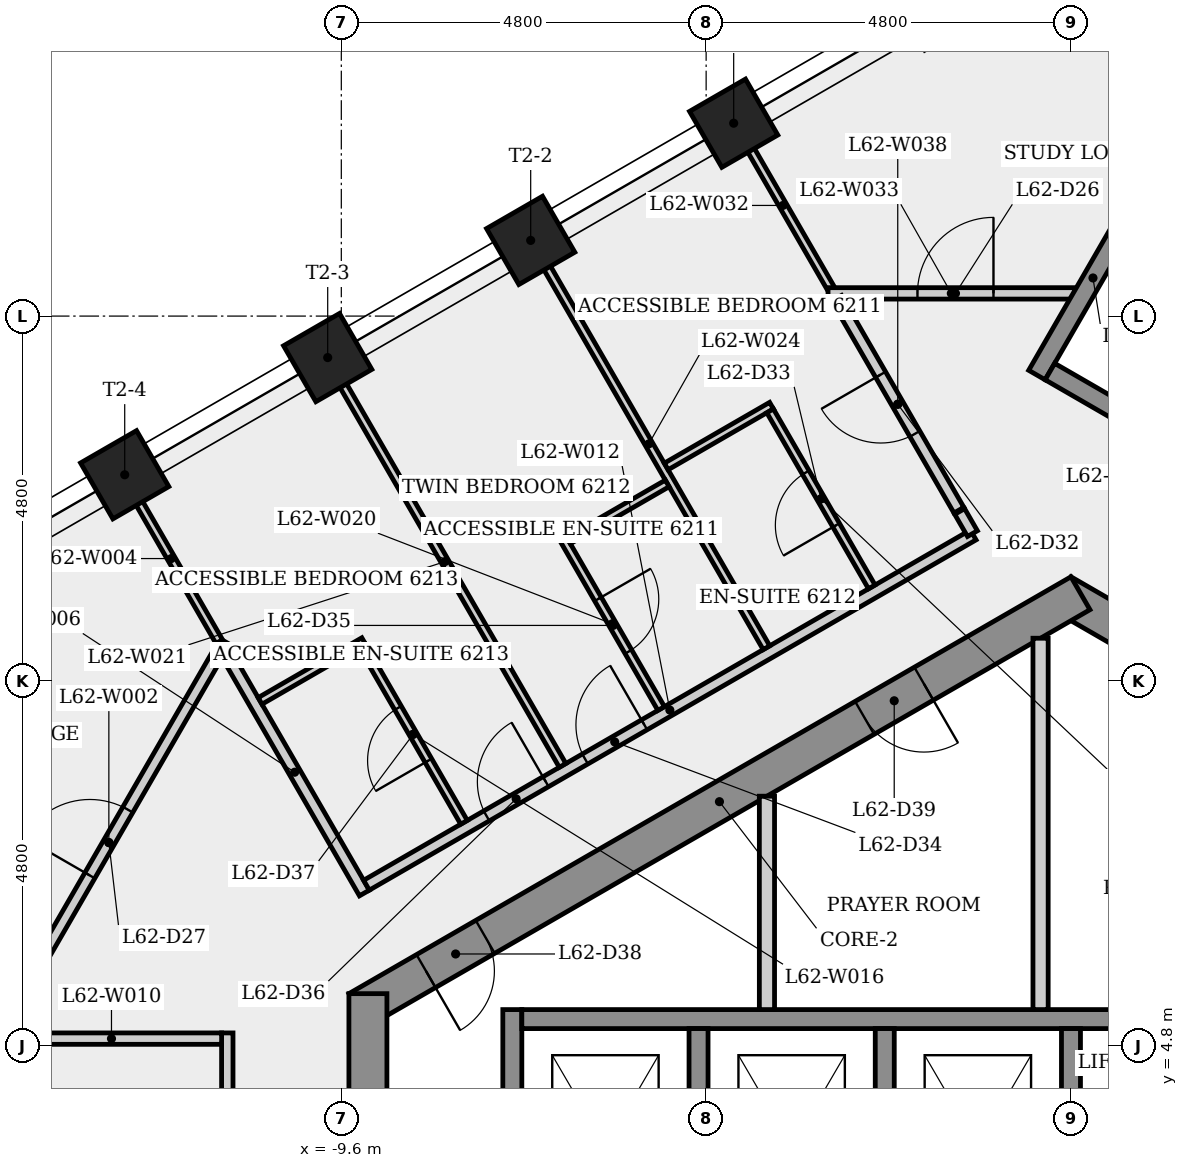
"""IFC4 building model, lengths in metres.
Left out: names, types, materials, properties, quantities, classifications, styles, units other than length and angle.
Written with IfcOpenShell. Run it as: python <this file> out.ifc"""

import sys

from ifc_helpers import new_model, si_unit, direction, frame, frame_2d, origin, origin_2d, place, context, subcontext, project, spatial, rectangle, extrude, element, fill, save


model = new_model("IFC4")
c1 = context("Model", 3, precision=1e-05, world=origin(), true_north=direction((0.0, 1.0)))
c2 = subcontext(c1, "Body", "Model", "MODEL_VIEW")
j1 = project(units=[si_unit("LENGTHUNIT", "METRE"), si_unit("PLANEANGLEUNIT", "RADIAN")], contexts=[c1])
p1 = place(None, origin())
s1 = spatial("IfcSite", under=j1, at=p1, CompositionType="ELEMENT")
p2 = place(p1, origin())
s2 = spatial("IfcBuilding", under=s1, at=p2, CompositionType="ELEMENT")
p3 = place(p2, frame((0.0, 0.0, 232.5)))
s3 = spatial("IfcBuildingStorey", under=s2, at=p3, CompositionType="ELEMENT", Elevation=232.5)
p4 = place(p3, frame((9.375, 5.268, 0.0), z_axis=(0.0, 0.0, 1.0), x_axis=(-0.866023993627, 0.500002442456, 0.0)))
e1 = element("IfcWall", 1, at=p4, inside=s3, PredefinedType="SHEAR", context=c2, shape_type="SweptSolid", body=[
    extrude(rectangle(XDim=10.97, YDim=0.5, at=frame_2d((5.485, 0.0))), origin(), (0.0, 0.0, 1.0), 3.4),
])
p5 = place(p4, frame((8.383, 0.0, 0.0)))
e2 = element("IfcOpeningElement", 2, at=p5, cuts=e1, PredefinedType="OPENING", context=c2, shape_type="SweptSolid", body=[
    extrude(rectangle(XDim=0.9, YDim=2.1, at=frame_2d((0.45, 1.05))), frame((0.0, 0.26, 0.0), z_axis=(0.0, -1.0, 0.0), x_axis=(1.0, 0.0, 0.0)), (0.0, 0.0, 1.0), 0.52),
])
p6 = place(p4, frame((3.165, 0.0, 0.0)))
e3 = element("IfcOpeningElement", 3, at=p6, cuts=e1, PredefinedType="OPENING", context=c2, shape_type="SweptSolid", body=[
    extrude(rectangle(XDim=0.9, YDim=2.1, at=frame_2d((0.45, 1.05))), frame((0.0, 0.26, 0.0), z_axis=(0.0, -1.0, 0.0), x_axis=(1.0, 0.0, 0.0)), (0.0, 0.0, 1.0), 0.52),
])
p7 = place(p3, frame((0.125, 10.753, 0.0), z_axis=(0.0, 0.0, 1.0), x_axis=(-0.866023993627, -0.500002442456, 0.0)))
e4 = element("IfcWall", 4, at=p7, inside=s3, PredefinedType="SHEAR", context=c2, shape_type="SweptSolid", body=[
    extrude(rectangle(XDim=10.97, YDim=0.5, at=frame_2d((5.485, 0.0))), origin(), (0.0, 0.0, 1.0), 3.4),
])
p8 = place(p7, frame((9.043, 0.0, 0.0)))
e5 = element("IfcOpeningElement", 5, at=p8, cuts=e4, PredefinedType="OPENING", context=c2, shape_type="SweptSolid", body=[
    extrude(rectangle(XDim=0.9, YDim=2.1, at=frame_2d((0.45, 1.05))), frame((0.0, 0.26, 0.0), z_axis=(0.0, -1.0, 0.0), x_axis=(1.0, 0.0, 0.0)), (0.0, 0.0, 1.0), 0.52),
])
p9 = place(p7, frame((2.38, 0.0, 0.0)))
e6 = element("IfcOpeningElement", 6, at=p9, cuts=e4, PredefinedType="OPENING", context=c2, shape_type="SweptSolid", body=[
    extrude(rectangle(XDim=0.9, YDim=2.1, at=frame_2d((0.45, 1.05))), frame((0.0, 0.26, 0.0), z_axis=(0.0, -1.0, 0.0), x_axis=(1.0, 0.0, 0.0)), (0.0, 0.0, 1.0), 0.52),
])
p10 = place(p3, frame((-9.25, 5.485, 0.0), z_axis=(0.0, 0.0, 1.0), x_axis=(0.0, -1.0, 0.0)))
e7 = element("IfcWall", 7, at=p10, inside=s3, PredefinedType="SHEAR", context=c2, shape_type="SweptSolid", body=[
    extrude(rectangle(XDim=10.97, YDim=0.5, at=frame_2d((5.485, 0.0))), origin(), (0.0, 0.0, 1.0), 3.4),
])
p11 = place(p10, frame((8.51, 0.0, 0.0)))
e8 = element("IfcOpeningElement", 8, at=p11, cuts=e7, PredefinedType="OPENING", context=c2, shape_type="SweptSolid", body=[
    extrude(rectangle(XDim=0.9, YDim=2.1, at=frame_2d((0.45, 1.05))), frame((0.0, 0.26, 0.0), z_axis=(0.0, -1.0, 0.0), x_axis=(1.0, 0.0, 0.0)), (0.0, 0.0, 1.0), 0.52),
])
p12 = place(p10, frame((4.685, 0.0, 0.0)))
e9 = element("IfcOpeningElement", 9, at=p12, cuts=e7, PredefinedType="OPENING", context=c2, shape_type="SweptSolid", body=[
    extrude(rectangle(XDim=1.6, YDim=2.1, at=frame_2d((0.8, 1.05))), frame((0.0, 0.26, 0.0), z_axis=(0.0, -1.0, 0.0), x_axis=(1.0, 0.0, 0.0)), (0.0, 0.0, 1.0), 0.52),
])
for number, where, z_axis, x_axis in (
    (10, (-4.438, 16.938, 0.0), (0.0, 0.0, 1.0), (-0.5, 0.866, 0.0)),
    (11, (-7.108, 15.396, 0.0), (0.0, 0.0, 1.0), (-0.5, 0.866, 0.0)),
    (12, (-9.779, 13.854, 0.0), (0.0, 0.0, 1.0), (-0.5, 0.866, 0.0)),
    (13, (-12.45, 12.312, 0.0), (0.0, 0.0, 1.0), (-0.5, 0.866, 0.0)),
):
    element("IfcColumn", number, at=place(p3, frame(where, z_axis=z_axis, x_axis=x_axis)), inside=s3, PredefinedType="COLUMN", context=c2, shape_type="SweptSolid", body=[
        extrude(rectangle(XDim=0.85, YDim=0.85, at=origin_2d()), origin(), (0.0, 0.0, 1.0), 3.4),
    ])
p13 = place(p3, frame((-14.185, 4.828, 0.0), z_axis=(0.0, 0.0, 1.0), x_axis=(0.50002117804, 0.866013176292, 0.0)))
e14 = element("IfcWall", 14, at=p13, inside=s3, PredefinedType="PARTITIONING", context=c2, shape_type="SweptSolid", body=[
    extrude(rectangle(XDim=6.108, YDim=0.15, at=frame_2d((3.054, 0.0))), origin(), (0.0, 0.0, 1.0), 3.05),
])
p14 = place(p13, frame((2.554, 0.0, 0.0)))
e15 = element("IfcOpeningElement", 15, at=p14, cuts=e14, PredefinedType="OPENING", context=c2, shape_type="SweptSolid", body=[
    extrude(rectangle(XDim=1.0, YDim=2.1, at=frame_2d((0.5, 1.05))), frame((0.0, 0.085, 0.0), z_axis=(0.0, -1.0, 0.0), x_axis=(1.0, 0.0, 0.0)), (0.0, 0.0, 1.0), 0.17),
])
p15 = place(p3, frame((-12.468, 12.302, 0.0), z_axis=(0.0, 0.0, 1.0), x_axis=(0.500032459767, -0.866006662318, 0.0)))
e16 = element("IfcWall", 16, at=p15, inside=s3, PredefinedType="PARTITIONING", context=c2, shape_type="SweptSolid", body=[
    extrude(rectangle(XDim=2.522, YDim=0.1, at=frame_2d((1.261, 0.0))), origin(), (0.0, 0.0, 1.0), 3.05),
])
p16 = place(p3, frame((-11.131, 9.988, 0.0), z_axis=(0.0, 0.0, 1.0), x_axis=(0.499973899091, -0.866040472627, 0.0)))
e17 = element("IfcWall", 17, at=p16, inside=s3, PredefinedType="PARTITIONING", context=c2, shape_type="SweptSolid", body=[
    extrude(rectangle(XDim=3.67, YDim=0.15, at=frame_2d((1.835, 0.0))), origin(), (0.0, 0.0, 1.0), 3.05),
])
p17 = place(p3, frame((-11.1, -4.893, 0.0), z_axis=(0.0, 0.0, 1.0), x_axis=(0.0, 1.0, 0.0)))
e18 = element("IfcWall", 18, at=p17, inside=s3, PredefinedType="PARTITIONING", context=c2, shape_type="SweptSolid", body=[
    extrude(rectangle(XDim=9.861, YDim=0.15, at=frame_2d((4.931, 0.0))), origin(), (0.0, 0.0, 1.0), 3.05),
])
p18 = place(p17, frame((7.655, 0.0, 0.0)))
e19 = element("IfcOpeningElement", 19, at=p18, cuts=e18, PredefinedType="OPENING", context=c2, shape_type="SweptSolid", body=[
    extrude(rectangle(XDim=1.0, YDim=2.1, at=frame_2d((0.5, 1.05))), frame((0.0, 0.085, 0.0), z_axis=(0.0, -1.0, 0.0), x_axis=(1.0, 0.0, 0.0)), (0.0, 0.0, 1.0), 0.17),
])
p19 = place(p17, frame((4.393, 0.0, 0.0)))
e20 = element("IfcOpeningElement", 20, at=p19, cuts=e18, PredefinedType="OPENING", context=c2, shape_type="SweptSolid", body=[
    extrude(rectangle(XDim=1.0, YDim=2.1, at=frame_2d((0.5, 1.05))), frame((0.0, 0.085, 0.0), z_axis=(0.0, -1.0, 0.0), x_axis=(1.0, 0.0, 0.0)), (0.0, 0.0, 1.0), 0.17),
])
p20 = place(p17, frame((1.131, 0.0, 0.0)))
e21 = element("IfcOpeningElement", 21, at=p20, cuts=e18, PredefinedType="OPENING", context=c2, shape_type="SweptSolid", body=[
    extrude(rectangle(XDim=1.0, YDim=2.1, at=frame_2d((0.5, 1.05))), frame((0.0, 0.085, 0.0), z_axis=(0.0, -1.0, 0.0), x_axis=(1.0, 0.0, 0.0)), (0.0, 0.0, 1.0), 0.17),
])
p21 = place(p3, frame((-11.175, 4.893, 0.0), z_axis=(0.0, 0.0, 1.0), x_axis=(-1.0, 0.0, 0.0)))
e22 = element("IfcWall", 22, at=p21, inside=s3, PredefinedType="PARTITIONING", context=c2, shape_type="SweptSolid", body=[
    extrude(rectangle(XDim=2.898, YDim=0.15, at=frame_2d((1.449, 0.0))), origin(), (0.0, 0.0, 1.0), 3.05),
])
p22 = place(p3, frame((-9.305, 10.124, 0.0), z_axis=(0.0, 0.0, 1.0), x_axis=(-0.866069430361, -0.499923735979, 0.0)))
e23 = element("IfcWall", 23, at=p22, inside=s3, PredefinedType="PARTITIONING", context=c2, shape_type="SweptSolid", body=[
    extrude(rectangle(XDim=1.575, YDim=0.1, at=frame_2d((0.788, 0.0))), origin(), (0.0, 0.0, 1.0), 3.05),
])
p23 = place(p3, frame((-9.269, 6.912, 0.0), z_axis=(0.0, 0.0, 1.0), x_axis=(0.866021065666, 0.500007513767, 0.0)))
e24 = element("IfcWall", 24, at=p23, inside=s3, PredefinedType="PARTITIONING", context=c2, shape_type="SweptSolid", body=[
    extrude(rectangle(XDim=9.218, YDim=0.15, at=frame_2d((4.609, 0.0))), origin(), (0.0, 0.0, 1.0), 3.05),
])
p24 = place(p23, frame((3.321, 0.0, 0.0)))
e25 = element("IfcOpeningElement", 25, at=p24, cuts=e24, PredefinedType="OPENING", context=c2, shape_type="SweptSolid", body=[
    extrude(rectangle(XDim=0.9, YDim=2.1, at=frame_2d((0.45, 1.05))), frame((0.0, 0.085, 0.0), z_axis=(0.0, -1.0, 0.0), x_axis=(1.0, 0.0, 0.0)), (0.0, 0.0, 1.0), 0.17),
])
p25 = place(p23, frame((1.824, 0.0, 0.0)))
e26 = element("IfcOpeningElement", 26, at=p25, cuts=e24, PredefinedType="OPENING", context=c2, shape_type="SweptSolid", body=[
    extrude(rectangle(XDim=0.9, YDim=2.1, at=frame_2d((0.45, 1.05))), frame((0.0, 0.085, 0.0), z_axis=(0.0, -1.0, 0.0), x_axis=(1.0, 0.0, 0.0)), (0.0, 0.0, 1.0), 0.17),
])
p26 = place(p3, frame((-7.986, 7.739, 0.0), z_axis=(0.0, 0.0, 1.0), x_axis=(-0.50003581814, 0.866004723184, 0.0)))
e27 = element("IfcWall", 27, at=p26, inside=s3, PredefinedType="PARTITIONING", context=c2, shape_type="SweptSolid", body=[
    extrude(rectangle(XDim=2.675, YDim=0.1, at=frame_2d((1.337, 0.0))), origin(), (0.0, 0.0, 1.0), 3.05),
])
p27 = place(p26, frame((0.938, 0.0, 0.0)))
e28 = element("IfcOpeningElement", 28, at=p27, cuts=e27, PredefinedType="OPENING", context=c2, shape_type="SweptSolid", body=[
    extrude(rectangle(XDim=0.8, YDim=2.1, at=frame_2d((0.4, 1.05))), frame((0.0, 0.06, 0.0), z_axis=(0.0, -1.0, 0.0), x_axis=(1.0, 0.0, 0.0)), (0.0, 0.0, 1.0), 0.12),
])
p28 = place(p3, frame((-7.35, 1.925, 0.0), z_axis=(0.0, 0.0, 1.0), x_axis=(0.0, 1.0, 0.0)))
e29 = element("IfcWall", 29, at=p28, inside=s3, PredefinedType="SHEAR", context=c2, shape_type="SweptSolid", body=[
    extrude(rectangle(XDim=3.35, YDim=0.25, at=frame_2d((1.675, 0.0))), origin(), (0.0, 0.0, 1.0), 3.05),
])
p29 = place(p3, frame((-7.225, 5.15, 0.0), z_axis=(0.0, 0.0, 1.0), x_axis=(1.0, 0.0, 0.0)))
e30 = element("IfcWall", 30, at=p29, inside=s3, PredefinedType="SHEAR", context=c2, shape_type="SweptSolid", body=[
    extrude(rectangle(XDim=14.7, YDim=0.25, at=frame_2d((7.35, 0.0))), origin(), (0.0, 0.0, 1.0), 3.05),
])
p30 = place(p3, frame((-6.679, 11.467, 0.0), z_axis=(0.0, 0.0, 1.0), x_axis=(0.500034319456, -0.866005588531, 0.0)))
e31 = element("IfcWall", 31, at=p30, inside=s3, PredefinedType="PARTITIONING", context=c2, shape_type="SweptSolid", body=[
    extrude(rectangle(XDim=2.575, YDim=0.1, at=frame_2d((1.288, 0.0))), origin(), (0.0, 0.0, 1.0), 3.05),
])
p31 = place(p30, frame((0.913, 0.0, 0.0)))
e32 = element("IfcOpeningElement", 32, at=p31, cuts=e31, PredefinedType="OPENING", context=c2, shape_type="SweptSolid", body=[
    extrude(rectangle(XDim=0.8, YDim=2.1, at=frame_2d((0.4, 1.05))), frame((0.0, 0.06, 0.0), z_axis=(0.0, -1.0, 0.0), x_axis=(1.0, 0.0, 0.0)), (0.0, 0.0, 1.0), 0.12),
])
p32 = place(p3, frame((-6.689, 8.488, 0.0), z_axis=(0.0, 0.0, 1.0), x_axis=(-0.499997752344, 0.866026701465, 0.0)))
e33 = element("IfcWall", 33, at=p32, inside=s3, PredefinedType="PARTITIONING", context=c2, shape_type="SweptSolid", body=[
    extrude(rectangle(XDim=6.192, YDim=0.1, at=frame_2d((3.096, 0.0))), origin(), (0.0, 0.0, 1.0), 3.05),
])
p33 = place(p3, frame((-7.103, 15.399, 0.0), z_axis=(0.0, 0.0, 1.0), x_axis=(0.500027320894, -0.866009629484, 0.0)))
e34 = element("IfcWall", 34, at=p33, inside=s3, PredefinedType="PARTITIONING", context=c2, shape_type="SweptSolid", body=[
    extrude(rectangle(XDim=6.193, YDim=0.1, at=frame_2d((3.096, 0.0))), origin(), (0.0, 0.0, 1.0), 3.05),
])
p34 = place(p3, frame((-5.312, 12.198, 0.0), z_axis=(0.0, 0.0, 1.0), x_axis=(-0.866031096941, -0.499990139034, 0.0)))
e35 = element("IfcWall", 35, at=p34, inside=s3, PredefinedType="PARTITIONING", context=c2, shape_type="SweptSolid", body=[
    extrude(rectangle(XDim=1.5, YDim=0.1, at=frame_2d((0.75, 0.0))), origin(), (0.0, 0.0, 1.0), 3.05),
])
p35 = place(p3, frame((-4.9, 5.025, 0.0), z_axis=(0.0, 0.0, 1.0), x_axis=(0.0, -1.0, 0.0)))
e36 = element("IfcWall", 36, at=p35, inside=s3, PredefinedType="SHEAR", context=c2, shape_type="SweptSolid", body=[
    extrude(rectangle(XDim=3.1, YDim=0.25, at=frame_2d((1.55, 0.0))), origin(), (0.0, 0.0, 1.0), 3.4),
])
p36 = place(p3, frame((-4.0, 8.083, 0.0), z_axis=(0.0, 0.0, 1.0), x_axis=(0.0, -1.0, 0.0)))
e37 = element("IfcWall", 37, at=p36, inside=s3, PredefinedType="PARTITIONING", context=c2, shape_type="SweptSolid", body=[
    extrude(rectangle(XDim=2.808, YDim=0.2, at=frame_2d((1.404, 0.0))), origin(), (0.0, 0.0, 1.0), 3.05),
])
p37 = place(p3, frame((-3.94, 13.221, 0.0), z_axis=(0.0, 0.0, 1.0), x_axis=(-0.866028054938, -0.499995408039, 0.0)))
e38 = element("IfcWall", 38, at=p37, inside=s3, PredefinedType="PARTITIONING", context=c2, shape_type="SweptSolid", body=[
    extrude(rectangle(XDim=1.6, YDim=0.1, at=frame_2d((0.8, 0.0))), origin(), (0.0, 0.0, 1.0), 3.05),
])
p38 = place(p3, frame((-3.159, 14.764, 0.0), z_axis=(0.0, 0.0, 1.0), x_axis=(-0.500032459767, 0.866006662318, 0.0)))
e39 = element("IfcWall", 39, at=p38, inside=s3, PredefinedType="PARTITIONING", context=c2, shape_type="SweptSolid", body=[
    extrude(rectangle(XDim=2.522, YDim=0.1, at=frame_2d((1.261, 0.0))), origin(), (0.0, 0.0, 1.0), 3.05),
])
p39 = place(p3, frame((-3.196, 14.699, 0.0), z_axis=(0.0, 0.0, 1.0), x_axis=(1.0, 0.0, 0.0)))
e40 = element("IfcWall", 40, at=p39, inside=s3, PredefinedType="PARTITIONING", context=c2, shape_type="SweptSolid", body=[
    extrude(rectangle(XDim=3.244, YDim=0.15, at=frame_2d((1.622, 0.0))), origin(), (0.0, 0.0, 1.0), 3.05),
])
p40 = place(p39, frame((1.177, 0.0, 0.0)))
e41 = element("IfcOpeningElement", 41, at=p40, cuts=e40, PredefinedType="OPENING", context=c2, shape_type="SweptSolid", body=[
    extrude(rectangle(XDim=1.0, YDim=2.1, at=frame_2d((0.5, 1.05))), frame((0.0, 0.085, 0.0), z_axis=(0.0, -1.0, 0.0), x_axis=(1.0, 0.0, 0.0)), (0.0, 0.0, 1.0), 0.17),
])
p41 = place(p3, frame((-2.621, 10.836, 0.0), z_axis=(0.0, 0.0, 1.0), x_axis=(-0.499967368674, 0.86604424267, 0.0)))
e42 = element("IfcWall", 42, at=p41, inside=s3, PredefinedType="PARTITIONING", context=c2, shape_type="SweptSolid", body=[
    extrude(rectangle(XDim=2.675, YDim=0.1, at=frame_2d((1.337, 0.0))), origin(), (0.0, 0.0, 1.0), 3.05),
])
p42 = place(p41, frame((0.938, 0.0, 0.0)))
e43 = element("IfcOpeningElement", 43, at=p42, cuts=e42, PredefinedType="OPENING", context=c2, shape_type="SweptSolid", body=[
    extrude(rectangle(XDim=0.8, YDim=2.1, at=frame_2d((0.4, 1.05))), frame((0.0, 0.06, 0.0), z_axis=(0.0, -1.0, 0.0), x_axis=(1.0, 0.0, 0.0)), (0.0, 0.0, 1.0), 0.12),
])
p43 = place(p3, frame((-2.45, 5.025, 0.0), z_axis=(0.0, 0.0, 1.0), x_axis=(0.0, -1.0, 0.0)))
e44 = element("IfcWall", 44, at=p43, inside=s3, PredefinedType="SHEAR", context=c2, shape_type="SweptSolid", body=[
    extrude(rectangle(XDim=3.1, YDim=0.25, at=frame_2d((1.55, 0.0))), origin(), (0.0, 0.0, 1.0), 3.4),
])
p44 = place(p3, frame((-1.474, 11.846, 0.0), z_axis=(0.0, 0.0, 1.0), x_axis=(-0.499989454812, 0.866031491966, 0.0)))
e45 = element("IfcWall", 45, at=p44, inside=s3, PredefinedType="PARTITIONING", context=c2, shape_type="SweptSolid", body=[
    extrude(rectangle(XDim=3.219, YDim=0.15, at=frame_2d((1.609, 0.0))), origin(), (0.0, 0.0, 1.0), 3.05),
])
p45 = place(p44, frame((1.159, 0.0, 0.0)))
e46 = element("IfcOpeningElement", 46, at=p45, cuts=e45, PredefinedType="OPENING", context=c2, shape_type="SweptSolid", body=[
    extrude(rectangle(XDim=0.9, YDim=2.1, at=frame_2d((0.45, 1.05))), frame((0.0, 0.085, 0.0), z_axis=(0.0, -1.0, 0.0), x_axis=(1.0, 0.0, 0.0)), (0.0, 0.0, 1.0), 0.17),
])
p46 = place(p3, frame((-1.464, 11.829, 0.0), z_axis=(0.0, 0.0, 1.0), x_axis=(0.499806183056, -0.866137275136, 0.0)))
e47 = element("IfcWall", 47, at=p46, inside=s3, PredefinedType="PARTITIONING", context=c2, shape_type="SweptSolid", body=[
    extrude(rectangle(XDim=0.337, YDim=0.15, at=frame_2d((0.168, 0.0))), origin(), (0.0, 0.0, 1.0), 3.05),
])
p47 = place(p3, frame((-0.4, 10.161, 0.0), z_axis=(0.0, 0.0, 1.0), x_axis=(0.0, -1.0, 0.0)))
e48 = element("IfcWall", 48, at=p47, inside=s3, PredefinedType="PARTITIONING", context=c2, shape_type="SweptSolid", body=[
    extrude(rectangle(XDim=4.886, YDim=0.2, at=frame_2d((2.443, 0.0))), origin(), (0.0, 0.0, 1.0), 3.05),
])
p48 = place(p3, frame((-0.448, 13.624, 0.0), z_axis=(0.0, 0.0, 1.0), x_axis=(0.500037662692, 0.866003658127, 0.0)))
e49 = element("IfcWall", 49, at=p48, inside=s3, PredefinedType="SHEAR", context=c2, shape_type="SweptSolid", body=[
    extrude(rectangle(XDim=2.95, YDim=0.25, at=frame_2d((1.475, 0.0))), origin(), (0.0, 0.0, 1.0), 3.05),
])
p49 = place(p3, frame((0.0, 5.025, 0.0), z_axis=(0.0, 0.0, 1.0), x_axis=(0.0, -1.0, 0.0)))
e50 = element("IfcWall", 50, at=p49, inside=s3, PredefinedType="SHEAR", context=c2, shape_type="SweptSolid", body=[
    extrude(rectangle(XDim=3.1, YDim=0.25, at=frame_2d((1.55, 0.0))), origin(), (0.0, 0.0, 1.0), 3.4),
])
p50 = place(p3, frame((2.581, 12.02, 0.0), z_axis=(0.0, 0.0, 1.0), x_axis=(-0.866040211805, 0.499974350878, 0.0)))
e51 = element("IfcWall", 51, at=p50, inside=s3, PredefinedType="SHEAR", context=c2, shape_type="SweptSolid", body=[
    extrude(rectangle(XDim=3.3, YDim=0.25, at=frame_2d((1.65, 0.0))), origin(), (0.0, 0.0, 1.0), 3.05),
])
p51 = place(p40, origin())
e52 = element("IfcDoor", 52, at=p51, inside=s3, OperationType="SINGLE_SWING_RIGHT", PredefinedType="DOOR", context=c2, shape_type="SweptSolid", body=[
    extrude(rectangle(XDim=1.0, YDim=2.1, at=frame_2d((0.5, 1.05))), frame((0.0, 0.025, 0.0), z_axis=(0.0, -1.0, 0.0), x_axis=(1.0, 0.0, 0.0)), (0.0, 0.0, 1.0), 0.05),
])
fill(e41, e52)
p52 = place(p14, origin())
e53 = element("IfcDoor", 53, at=p52, inside=s3, OperationType="SINGLE_SWING_LEFT", PredefinedType="DOOR", context=c2, shape_type="SweptSolid", body=[
    extrude(rectangle(XDim=1.0, YDim=2.1, at=frame_2d((0.5, 1.05))), frame((0.0, 0.025, 0.0), z_axis=(0.0, -1.0, 0.0), x_axis=(1.0, 0.0, 0.0)), (0.0, 0.0, 1.0), 0.05),
])
fill(e15, e53)
p53 = place(p45, origin())
e54 = element("IfcDoor", 54, at=p53, inside=s3, OperationType="SINGLE_SWING_RIGHT", PredefinedType="DOOR", context=c2, shape_type="SweptSolid", body=[
    extrude(rectangle(XDim=0.9, YDim=2.1, at=frame_2d((0.45, 1.05))), frame((0.0, 0.025, 0.0), z_axis=(0.0, -1.0, 0.0), x_axis=(1.0, 0.0, 0.0)), (0.0, 0.0, 1.0), 0.05),
])
fill(e46, e54)
p54 = place(p42, origin())
e55 = element("IfcDoor", 55, at=p54, inside=s3, OperationType="SINGLE_SWING_LEFT", PredefinedType="DOOR", context=c2, shape_type="SweptSolid", body=[
    extrude(rectangle(XDim=0.8, YDim=2.1, at=frame_2d((0.4, 1.05))), frame((0.0, 0.025, 0.0), z_axis=(0.0, -1.0, 0.0), x_axis=(1.0, 0.0, 0.0)), (0.0, 0.0, 1.0), 0.05),
])
fill(e43, e55)
p55 = place(p24, origin())
e56 = element("IfcDoor", 56, at=p55, inside=s3, OperationType="SINGLE_SWING_RIGHT", PredefinedType="DOOR", context=c2, shape_type="SweptSolid", body=[
    extrude(rectangle(XDim=0.9, YDim=2.1, at=frame_2d((0.45, 1.05))), frame((0.0, 0.025, 0.0), z_axis=(0.0, -1.0, 0.0), x_axis=(1.0, 0.0, 0.0)), (0.0, 0.0, 1.0), 0.05),
])
fill(e25, e56)
p56 = place(p31, origin())
e57 = element("IfcDoor", 57, at=p56, inside=s3, OperationType="SINGLE_SWING_LEFT", PredefinedType="DOOR", context=c2, shape_type="SweptSolid", body=[
    extrude(rectangle(XDim=0.8, YDim=2.1, at=frame_2d((0.4, 1.05))), frame((0.0, 0.025, 0.0), z_axis=(0.0, -1.0, 0.0), x_axis=(1.0, 0.0, 0.0)), (0.0, 0.0, 1.0), 0.05),
])
fill(e32, e57)
p57 = place(p25, origin())
e58 = element("IfcDoor", 58, at=p57, inside=s3, OperationType="SINGLE_SWING_RIGHT", PredefinedType="DOOR", context=c2, shape_type="SweptSolid", body=[
    extrude(rectangle(XDim=0.9, YDim=2.1, at=frame_2d((0.45, 1.05))), frame((0.0, 0.025, 0.0), z_axis=(0.0, -1.0, 0.0), x_axis=(1.0, 0.0, 0.0)), (0.0, 0.0, 1.0), 0.05),
])
fill(e26, e58)
p58 = place(p27, origin())
e59 = element("IfcDoor", 59, at=p58, inside=s3, OperationType="SINGLE_SWING_LEFT", PredefinedType="DOOR", context=c2, shape_type="SweptSolid", body=[
    extrude(rectangle(XDim=0.8, YDim=2.1, at=frame_2d((0.4, 1.05))), frame((0.0, 0.025, 0.0), z_axis=(0.0, -1.0, 0.0), x_axis=(1.0, 0.0, 0.0)), (0.0, 0.0, 1.0), 0.05),
])
fill(e28, e59)
p59 = place(p8, origin())
e60 = element("IfcDoor", 60, at=p59, inside=s3, OperationType="SINGLE_SWING_RIGHT", PredefinedType="DOOR", context=c2, shape_type="SweptSolid", body=[
    extrude(rectangle(XDim=0.9, YDim=2.1, at=frame_2d((0.45, 1.05))), frame((0.0, 0.025, 0.0), z_axis=(0.0, -1.0, 0.0), x_axis=(1.0, 0.0, 0.0)), (0.0, 0.0, 1.0), 0.05),
])
fill(e5, e60)
p60 = place(p9, origin())
e61 = element("IfcDoor", 61, at=p60, inside=s3, OperationType="SINGLE_SWING_LEFT", PredefinedType="DOOR", context=c2, shape_type="SweptSolid", body=[
    extrude(rectangle(XDim=0.9, YDim=2.1, at=frame_2d((0.45, 1.05))), frame((0.0, 0.025, 0.0), z_axis=(0.0, -1.0, 0.0), x_axis=(1.0, 0.0, 0.0)), (0.0, 0.0, 1.0), 0.05),
])
fill(e6, e61)
save(model, sys.argv[1])
